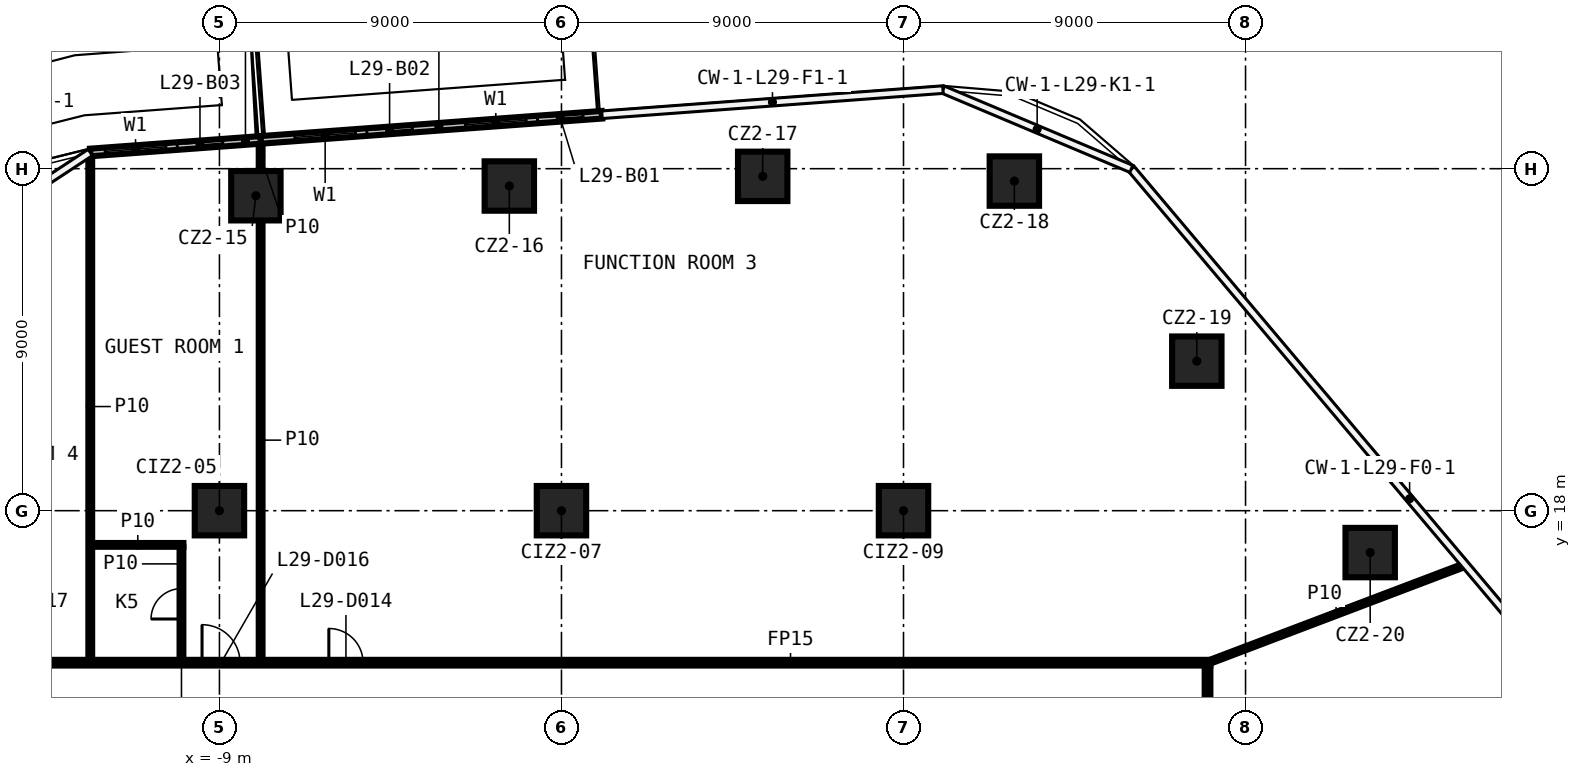
"""IFC4 building model, lengths in metres.
Left out: names, types, materials, properties, quantities, classifications, styles, units other than length and angle.
Written with IfcOpenShell. Run it as: python <this file> out.ifc"""

import sys

from ifc_helpers import new_model, si_unit, direction, frame, frame_2d, origin, origin_2d, place, context, subcontext, project, spatial, rectangle, extrude, element, fill, save


model = new_model("IFC4")
c1 = context("Model", 3, precision=1e-05, world=origin(), true_north=direction((0.0, 1.0)))
c2 = subcontext(c1, "Body", "Model", "MODEL_VIEW")
j1 = project(units=[si_unit("LENGTHUNIT", "METRE"), si_unit("PLANEANGLEUNIT", "RADIAN")], contexts=[c1])
p1 = place(None, origin())
s1 = spatial("IfcSite", under=j1, at=p1, CompositionType="ELEMENT")
p2 = place(p1, origin())
s2 = spatial("IfcBuilding", under=s1, at=p2, CompositionType="ELEMENT")
p3 = place(p2, frame((0.0, 0.0, 132.2)))
s3 = spatial("IfcBuildingStorey", under=s2, at=p3, CompositionType="ELEMENT", Elevation=132.2)
for number, where, z_axis, x_axis in (
    (1, (-8.041, 26.288, 0.0), (0.0, 0.0, 1.0), (1.0, 0.0, 0.0)),
    (2, (-1.372, 26.544, 0.0), (0.0, 0.0, 1.0), (1.0, 0.0, 0.0)),
    (3, (5.295, 26.798, 0.0), (0.0, 0.0, 1.0), (1.0, 0.0, 0.0)),
    (4, (11.917, 26.674, 0.0), (0.0, 0.0, 1.0), (1.0, 0.0, 0.0)),
    (5, (16.718, 21.935, 0.0), (0.0, 0.0, 1.0), (1.0, 0.0, 0.0)),
    (6, (21.28, 16.898, 0.0), (0.0, 0.0, 1.0), (1.0, 0.0, 0.0)),
    (7, (-9.0, 18.0, 0.0), (0.0, 0.0, 1.0), (1.0, 0.0, 0.0)),
    (8, (0.0, 18.0, 0.0), (0.0, 0.0, 1.0), (1.0, 0.0, 0.0)),
    (9, (9.0, 18.0, 0.0), (0.0, 0.0, 1.0), (1.0, 0.0, 0.0)),
):
    element("IfcColumn", number, at=place(p3, frame(where, z_axis=z_axis, x_axis=x_axis)), inside=s3, PredefinedType="COLUMN", context=c2, shape_type="SweptSolid", body=[
        extrude(rectangle(XDim=1.3, YDim=1.3, at=origin_2d()), origin(), (0.0, 0.0, 1.0), 3.3),
    ])
p4 = place(p3, frame((-17.075, 14.0, 0.0), z_axis=(0.0, 0.0, 1.0), x_axis=(1.0, 0.0, 0.0)))
e10 = element("IfcWall", 10, at=p4, inside=s3, PredefinedType="PARTITIONING", context=c2, shape_type="SweptSolid", body=[
    extrude(rectangle(XDim=34.15, YDim=0.15, at=frame_2d((17.075, 0.0))), origin(), (0.0, 0.0, 1.0), 3.3),
])
p5 = place(p4, frame((10.954, 0.0, 0.0)))
e11 = element("IfcOpeningElement", 11, at=p5, cuts=e10, PredefinedType="OPENING", context=c2, shape_type="SweptSolid", body=[
    extrude(rectangle(XDim=0.9, YDim=2.1, at=frame_2d((0.45, 1.05))), frame((0.0, 0.085, 0.0), z_axis=(0.0, -1.0, 0.0), x_axis=(1.0, 0.0, 0.0)), (0.0, 0.0, 1.0), 0.17),
])
p6 = place(p4, frame((7.617, 0.0, 0.0)))
e12 = element("IfcOpeningElement", 12, at=p6, cuts=e10, PredefinedType="OPENING", context=c2, shape_type="SweptSolid", body=[
    extrude(rectangle(XDim=1.0, YDim=2.1, at=frame_2d((0.5, 1.05))), frame((0.0, 0.085, 0.0), z_axis=(0.0, -1.0, 0.0), x_axis=(1.0, 0.0, 0.0)), (0.0, 0.0, 1.0), 0.17),
])
p7 = place(p4, frame((2.425, 0.0, 0.0)))
e13 = element("IfcOpeningElement", 13, at=p7, cuts=e10, PredefinedType="OPENING", context=c2, shape_type="SweptSolid", body=[
    extrude(rectangle(XDim=0.9, YDim=2.1, at=frame_2d((0.45, 1.05))), frame((0.0, 0.085, 0.0), z_axis=(0.0, -1.0, 0.0), x_axis=(1.0, 0.0, 0.0)), (0.0, 0.0, 1.0), 0.17),
])
p8 = place(p3, frame((-12.349, 17.1, 0.0), z_axis=(0.0, 0.0, 1.0), x_axis=(1.0, 0.0, 0.0)))
e14 = element("IfcWall", 14, at=p8, inside=s3, PredefinedType="PARTITIONING", context=c2, shape_type="SweptSolid", body=[
    extrude(rectangle(XDim=2.4, YDim=0.1, at=frame_2d((1.2, 0.0))), origin(), (0.0, 0.0, 1.0), 3.3),
])
p9 = place(p3, frame((17.0, 14.0, 0.0), z_axis=(0.0, 0.0, 1.0), x_axis=(0.934953139897, 0.354771230791, 0.0)))
e15 = element("IfcWall", 15, at=p9, inside=s3, PredefinedType="PARTITIONING", context=c2, shape_type="SweptSolid", body=[
    extrude(rectangle(XDim=7.234, YDim=0.1, at=frame_2d((3.617, 0.0))), origin(), (0.0, 0.0, 1.0), 3.3),
])
p10 = place(p3, frame((17.0, 13.925, 0.0), z_axis=(0.0, 0.0, 1.0), x_axis=(0.0, -1.0, 0.0)))
e16 = element("IfcWall", 16, at=p10, inside=s3, PredefinedType="PARTITIONING", context=c2, shape_type="SweptSolid", body=[
    extrude(rectangle(XDim=27.85, YDim=0.15, at=frame_2d((13.925, 0.0))), origin(), (0.0, 0.0, 1.0), 3.3),
])
p11 = place(p10, frame((24.983, 0.0, 0.0)))
e17 = element("IfcOpeningElement", 17, at=p11, cuts=e16, PredefinedType="OPENING", context=c2, shape_type="SweptSolid", body=[
    extrude(rectangle(XDim=0.9, YDim=2.1, at=frame_2d((0.45, 1.05))), frame((0.0, 0.085, 0.0), z_axis=(0.0, -1.0, 0.0), x_axis=(1.0, 0.0, 0.0)), (0.0, 0.0, 1.0), 0.17),
])
p12 = place(p10, frame((20.143, 0.0, 0.0)))
e18 = element("IfcOpeningElement", 18, at=p12, cuts=e16, PredefinedType="OPENING", context=c2, shape_type="SweptSolid", body=[
    extrude(rectangle(XDim=0.9, YDim=2.1, at=frame_2d((0.45, 1.05))), frame((0.0, 0.085, 0.0), z_axis=(0.0, -1.0, 0.0), x_axis=(1.0, 0.0, 0.0)), (0.0, 0.0, 1.0), 0.17),
])
p13 = place(p10, frame((11.054, 0.0, 0.0)))
e19 = element("IfcOpeningElement", 19, at=p13, cuts=e16, PredefinedType="OPENING", context=c2, shape_type="SweptSolid", body=[
    extrude(rectangle(XDim=1.0, YDim=2.1, at=frame_2d((0.5, 1.05))), frame((0.0, 0.085, 0.0), z_axis=(0.0, -1.0, 0.0), x_axis=(1.0, 0.0, 0.0)), (0.0, 0.0, 1.0), 0.17),
])
p14 = place(p10, frame((7.139, 0.0, 0.0)))
e20 = element("IfcOpeningElement", 20, at=p14, cuts=e16, PredefinedType="OPENING", context=c2, shape_type="SweptSolid", body=[
    extrude(rectangle(XDim=0.9, YDim=2.1, at=frame_2d((0.45, 1.05))), frame((0.0, 0.085, 0.0), z_axis=(0.0, -1.0, 0.0), x_axis=(1.0, 0.0, 0.0)), (0.0, 0.0, 1.0), 0.17),
])
p15 = place(p3, frame((-7.916, 14.075, 0.0), z_axis=(0.0, 0.0, 1.0), x_axis=(0.0, 1.0, 0.0)))
e21 = element("IfcWall", 21, at=p15, inside=s3, PredefinedType="PARTITIONING", context=c2, shape_type="SweptSolid", body=[
    extrude(rectangle(XDim=11.563, YDim=0.1, at=frame_2d((5.781, 0.0))), origin(), (0.0, 0.0, 1.0), 3.3),
])
p16 = place(p3, frame((-7.916, 26.938, 0.0), z_axis=(0.0, 0.0, 1.0), x_axis=(0.0, 1.0, 0.0)))
e22 = element("IfcWall", 22, at=p16, inside=s3, PredefinedType="PARTITIONING", context=c2, shape_type="SweptSolid", body=[
    extrude(rectangle(XDim=0.799, YDim=0.1, at=frame_2d((0.399, 0.0))), origin(), (0.0, 0.0, 1.0), 3.3),
])
p17 = place(p3, frame((-9.999, 14.075, 0.0), z_axis=(0.0, 0.0, 1.0), x_axis=(0.0, 1.0, 0.0)))
e23 = element("IfcWall", 23, at=p17, inside=s3, PredefinedType="PARTITIONING", context=c2, shape_type="SweptSolid", body=[
    extrude(rectangle(XDim=2.975, YDim=0.1, at=frame_2d((1.488, 0.0))), origin(), (0.0, 0.0, 1.0), 3.3),
])
p18 = place(p17, frame((1.075, 0.0, 0.0)))
e24 = element("IfcOpeningElement", 24, at=p18, cuts=e23, PredefinedType="OPENING", context=c2, shape_type="SweptSolid", body=[
    extrude(rectangle(XDim=0.8, YDim=2.1, at=frame_2d((0.4, 1.05))), frame((0.0, 0.06, 0.0), z_axis=(0.0, -1.0, 0.0), x_axis=(1.0, 0.0, 0.0)), (0.0, 0.0, 1.0), 0.12),
])
p19 = place(p3, frame((-12.399, 14.075, 0.0), z_axis=(0.0, 0.0, 1.0), x_axis=(0.0, 1.0, 0.0)))
e25 = element("IfcWall", 25, at=p19, inside=s3, PredefinedType="PARTITIONING", context=c2, shape_type="SweptSolid", body=[
    extrude(rectangle(XDim=13.331, YDim=0.1, at=frame_2d((6.666, 0.0))), origin(), (0.0, 0.0, 1.0), 3.3),
])
p20 = place(p3, frame((1.065, 28.419, 0.0), z_axis=(0.0, 0.0, 1.0), x_axis=(-0.997293582655, -0.07352217349, 0.0)))
e26 = element("IfcWall", 26, at=p20, inside=s3, PredefinedType="SOLIDWALL", context=c2, shape_type="SweptSolid", body=[
    extrude(rectangle(XDim=9.006, YDim=0.2, at=frame_2d((4.503, 0.0))), origin(), (0.0, 0.0, 1.0), 3.3),
])
p21 = place(p20, frame((2.0, 0.0, 0.6)))
e27 = element("IfcOpeningElement", 27, at=p21, cuts=e26, PredefinedType="OPENING", context=c2, shape_type="SweptSolid", body=[
    extrude(rectangle(XDim=1.6, YDim=2.4, at=frame_2d((0.8, 1.2))), frame((0.0, 0.11, 0.0), z_axis=(0.0, -1.0, 0.0), x_axis=(1.0, 0.0, 0.0)), (0.0, 0.0, 1.0), 0.22),
])
p22 = place(p20, frame((0.5, 0.0, 0.0)))
e28 = element("IfcOpeningElement", 28, at=p22, cuts=e26, PredefinedType="OPENING", context=c2, shape_type="SweptSolid", body=[
    extrude(rectangle(XDim=1.2, YDim=2.4, at=frame_2d((0.6, 1.2))), frame((0.0, 0.11, 0.0), z_axis=(0.0, -1.0, 0.0), x_axis=(1.0, 0.0, 0.0)), (0.0, 0.0, 1.0), 0.22),
])
p23 = place(p20, frame((6.503, 0.0, 0.6)))
e29 = element("IfcOpeningElement", 29, at=p23, cuts=e26, PredefinedType="OPENING", context=c2, shape_type="SweptSolid", body=[
    extrude(rectangle(XDim=1.6, YDim=2.4, at=frame_2d((0.8, 1.2))), frame((0.0, 0.11, 0.0), z_axis=(0.0, -1.0, 0.0), x_axis=(1.0, 0.0, 0.0)), (0.0, 0.0, 1.0), 0.22),
])
p24 = place(p20, frame((5.003, 0.0, 0.0)))
e30 = element("IfcOpeningElement", 30, at=p24, cuts=e26, PredefinedType="OPENING", context=c2, shape_type="SweptSolid", body=[
    extrude(rectangle(XDim=1.2, YDim=2.4, at=frame_2d((0.6, 1.2))), frame((0.0, 0.11, 0.0), z_axis=(0.0, -1.0, 0.0), x_axis=(1.0, 0.0, 0.0)), (0.0, 0.0, 1.0), 0.22),
])
p25 = place(p3, frame((-7.917, 27.757, 0.0), z_axis=(0.0, 0.0, 1.0), x_axis=(-0.997291417846, -0.073551532206, 0.0)))
e31 = element("IfcWall", 31, at=p25, inside=s3, PredefinedType="SOLIDWALL", context=c2, shape_type="SweptSolid", body=[
    extrude(rectangle(XDim=4.494, YDim=0.2, at=frame_2d((2.247, 0.0))), origin(), (0.0, 0.0, 1.0), 3.3),
])
p26 = place(p25, frame((2.5, 0.0, 0.6)))
e32 = element("IfcOpeningElement", 32, at=p26, cuts=e31, PredefinedType="OPENING", context=c2, shape_type="SweptSolid", body=[
    extrude(rectangle(XDim=1.6, YDim=2.4, at=frame_2d((0.8, 1.2))), frame((0.0, 0.11, 0.0), z_axis=(0.0, -1.0, 0.0), x_axis=(1.0, 0.0, 0.0)), (0.0, 0.0, 1.0), 0.22),
])
p27 = place(p25, frame((1.0, 0.0, 0.0)))
e33 = element("IfcOpeningElement", 33, at=p27, cuts=e31, PredefinedType="OPENING", context=c2, shape_type="SweptSolid", body=[
    extrude(rectangle(XDim=1.2, YDim=2.4, at=frame_2d((0.6, 1.2))), frame((0.0, 0.11, 0.0), z_axis=(0.0, -1.0, 0.0), x_axis=(1.0, 0.0, 0.0)), (0.0, 0.0, 1.0), 0.22),
])
p28 = place(p5, origin())
e34 = element("IfcDoor", 34, at=p28, inside=s3, OperationType="SINGLE_SWING_RIGHT", PredefinedType="DOOR", context=c2, shape_type="SweptSolid", body=[
    extrude(rectangle(XDim=0.9, YDim=2.1, at=frame_2d((0.45, 1.05))), frame((0.0, 0.025, 0.0), z_axis=(0.0, -1.0, 0.0), x_axis=(1.0, 0.0, 0.0)), (0.0, 0.0, 1.0), 0.05),
])
fill(e11, e34)
p29 = place(p18, origin())
e35 = element("IfcDoor", 35, at=p29, inside=s3, OperationType="SINGLE_SWING_RIGHT", PredefinedType="DOOR", context=c2, shape_type="SweptSolid", body=[
    extrude(rectangle(XDim=0.8, YDim=2.1, at=frame_2d((0.4, 1.05))), frame((0.0, 0.025, 0.0), z_axis=(0.0, -1.0, 0.0), x_axis=(1.0, 0.0, 0.0)), (0.0, 0.0, 1.0), 0.05),
])
fill(e24, e35)
p30 = place(p6, origin())
e36 = element("IfcDoor", 36, at=p30, inside=s3, OperationType="SINGLE_SWING_LEFT", PredefinedType="DOOR", context=c2, shape_type="SweptSolid", body=[
    extrude(rectangle(XDim=1.0, YDim=2.1, at=frame_2d((0.5, 1.05))), frame((0.0, 0.025, 0.0), z_axis=(0.0, -1.0, 0.0), x_axis=(1.0, 0.0, 0.0)), (0.0, 0.0, 1.0), 0.05),
])
fill(e12, e36)
p31 = place(p21, origin())
e37 = element("IfcWindow", 37, at=p31, inside=s3, PartitioningType="SINGLE_PANEL", PredefinedType="WINDOW", context=c2, shape_type="SweptSolid", body=[
    extrude(rectangle(XDim=1.6, YDim=2.4, at=frame_2d((0.8, 1.2))), frame((0.0, 0.03, 0.0), z_axis=(0.0, -1.0, 0.0), x_axis=(1.0, 0.0, 0.0)), (0.0, 0.0, 1.0), 0.06),
])
fill(e27, e37)
p32 = place(p22, origin())
e38 = element("IfcDoor", 38, at=p32, inside=s3, OperationType="SLIDING_TO_LEFT", PredefinedType="DOOR", context=c2, shape_type="SweptSolid", body=[
    extrude(rectangle(XDim=1.2, YDim=2.4, at=frame_2d((0.6, 1.2))), frame((0.0, 0.025, 0.0), z_axis=(0.0, -1.0, 0.0), x_axis=(1.0, 0.0, 0.0)), (0.0, 0.0, 1.0), 0.05),
])
fill(e28, e38)
p33 = place(p23, origin())
e39 = element("IfcWindow", 39, at=p33, inside=s3, PartitioningType="SINGLE_PANEL", PredefinedType="WINDOW", context=c2, shape_type="SweptSolid", body=[
    extrude(rectangle(XDim=1.6, YDim=2.4, at=frame_2d((0.8, 1.2))), frame((0.0, 0.03, 0.0), z_axis=(0.0, -1.0, 0.0), x_axis=(1.0, 0.0, 0.0)), (0.0, 0.0, 1.0), 0.06),
])
fill(e29, e39)
p34 = place(p24, origin())
e40 = element("IfcDoor", 40, at=p34, inside=s3, OperationType="SLIDING_TO_LEFT", PredefinedType="DOOR", context=c2, shape_type="SweptSolid", body=[
    extrude(rectangle(XDim=1.2, YDim=2.4, at=frame_2d((0.6, 1.2))), frame((0.0, 0.025, 0.0), z_axis=(0.0, -1.0, 0.0), x_axis=(1.0, 0.0, 0.0)), (0.0, 0.0, 1.0), 0.05),
])
fill(e30, e40)
p35 = place(p26, origin())
e41 = element("IfcWindow", 41, at=p35, inside=s3, PartitioningType="SINGLE_PANEL", PredefinedType="WINDOW", context=c2, shape_type="SweptSolid", body=[
    extrude(rectangle(XDim=1.6, YDim=2.4, at=frame_2d((0.8, 1.2))), frame((0.0, 0.03, 0.0), z_axis=(0.0, -1.0, 0.0), x_axis=(1.0, 0.0, 0.0)), (0.0, 0.0, 1.0), 0.06),
])
fill(e32, e41)
p36 = place(p27, origin())
e42 = element("IfcDoor", 42, at=p36, inside=s3, OperationType="SLIDING_TO_LEFT", PredefinedType="DOOR", context=c2, shape_type="SweptSolid", body=[
    extrude(rectangle(XDim=1.2, YDim=2.4, at=frame_2d((0.6, 1.2))), frame((0.0, 0.025, 0.0), z_axis=(0.0, -1.0, 0.0), x_axis=(1.0, 0.0, 0.0)), (0.0, 0.0, 1.0), 0.05),
])
fill(e33, e42)
save(model, sys.argv[1])
